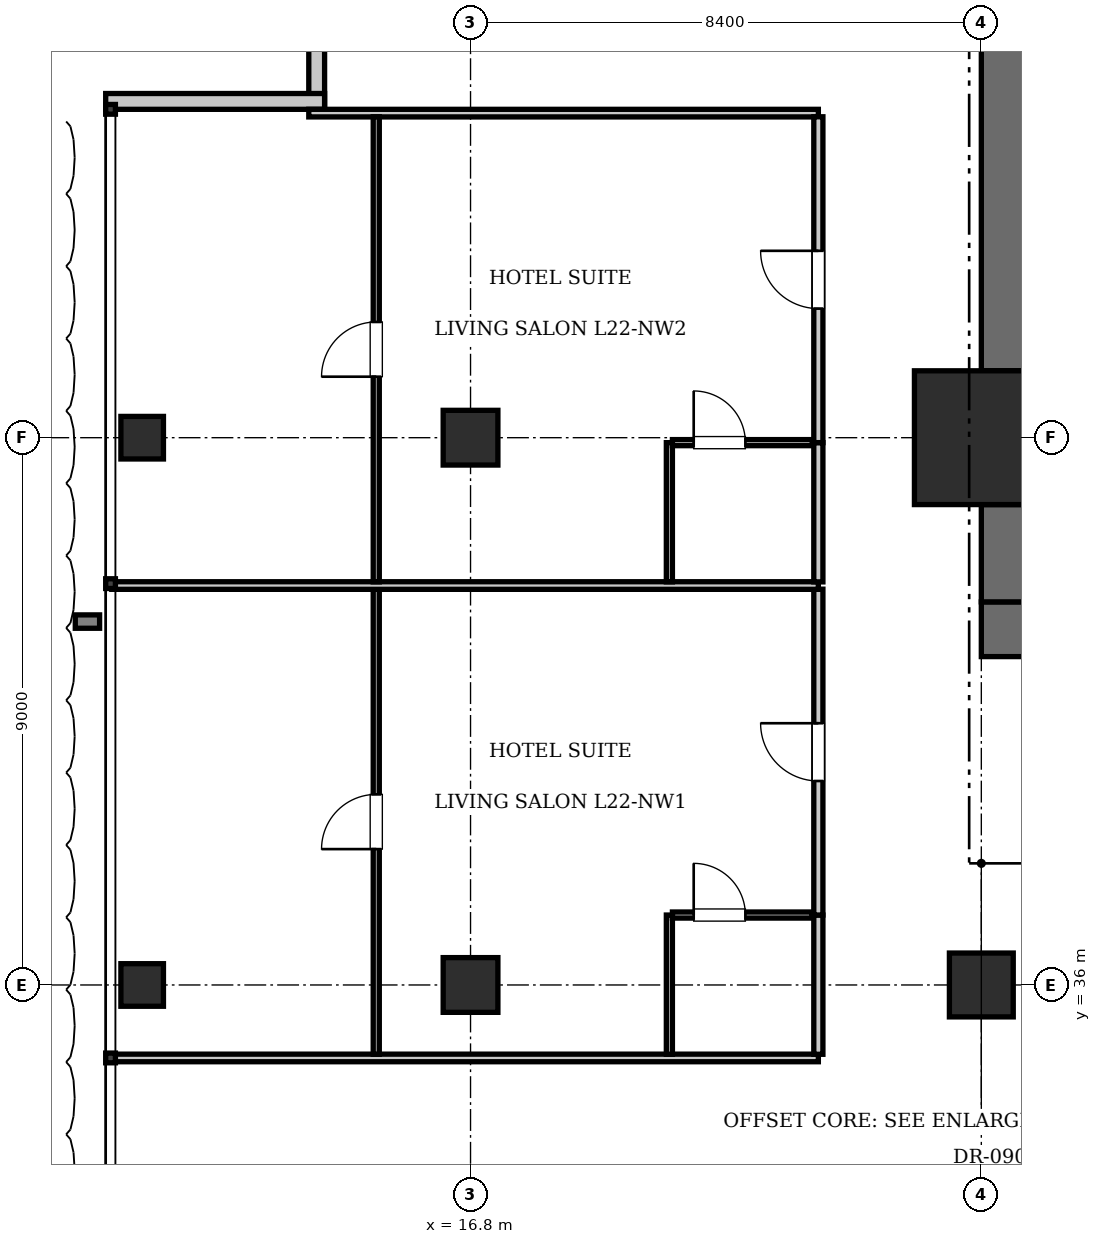
"""IFC4 building model, lengths in metres.
Left out: names, types, materials, properties, quantities, classifications, styles, units other than length and angle.
Written with IfcOpenShell. Run it as: python <this file> out.ifc"""

import sys

from ifc_helpers import new_model, si_unit, direction, frame, frame_2d, origin, origin_2d, place, context, subcontext, project, spatial, rectangle, i_section, extrude, element, fill, save


model = new_model("IFC4")
c1 = context("Model", 3, precision=1e-05, world=origin(), true_north=direction((0.0, 1.0)))
c2 = subcontext(c1, "Body", "Model", "MODEL_VIEW")
j1 = project(units=[si_unit("LENGTHUNIT", "METRE"), si_unit("PLANEANGLEUNIT", "RADIAN")], contexts=[c1])
p1 = place(None, origin())
s1 = spatial("IfcSite", under=j1, at=p1, CompositionType="ELEMENT")
p2 = place(p1, origin())
s2 = spatial("IfcBuilding", under=s1, at=p2, CompositionType="ELEMENT")
p3 = place(p2, frame((0.0, 0.0, 92.4)))
s3 = spatial("IfcBuildingStorey", under=s2, at=p3, CompositionType="ELEMENT", Elevation=92.4)
p4 = place(p3, frame((25.2, 45.0, 0.0), z_axis=(0.0, 0.0, 1.0), x_axis=(1.0, 0.0, 0.0)))
e1 = element("IfcColumn", 1, at=p4, inside=s3, PredefinedType="COLUMN", context=c2, shape_type="SweptSolid", body=[
    extrude(rectangle(XDim=2.2, YDim=2.2, at=origin_2d()), origin(), (0.0, 0.0, 1.0), 3.85),
])
p5 = place(p3, frame((25.2, 41.85, 0.0), z_axis=(0.0, 0.0, 1.0), x_axis=(1.0, 0.0, 0.0)))
e2 = element("IfcWall", 2, at=p5, inside=s3, PredefinedType="SHEAR", context=c2, shape_type="SweptSolid", body=[
    extrude(rectangle(XDim=6.8, YDim=0.9, at=frame_2d((3.4, 0.0))), origin(), (0.0, 0.0, 1.0), 3.85),
])
p6 = place(p5, frame((1.65, 0.0, 0.0)))
e3 = element("IfcOpeningElement", 3, at=p6, cuts=e2, PredefinedType="OPENING", context=c2, shape_type="SweptSolid", body=[
    extrude(rectangle(XDim=1.15, YDim=2.15, at=frame_2d((0.575, 1.075))), frame((0.0, 0.46, 0.0), z_axis=(0.0, -1.0, 0.0), x_axis=(1.0, 0.0, 0.0)), (0.0, 0.0, 1.0), 0.92),
])
p7 = place(p5, frame((5.15, 0.0, 0.0)))
e4 = element("IfcOpeningElement", 4, at=p7, cuts=e2, PredefinedType="OPENING", context=c2, shape_type="SweptSolid", body=[
    extrude(rectangle(XDim=1.1, YDim=2.2, at=frame_2d((0.55, 1.1))), frame((0.0, 0.46, 0.0), z_axis=(0.0, -1.0, 0.0), x_axis=(1.0, 0.0, 0.0)), (0.0, 0.0, 1.0), 0.92),
])
p8 = place(p3, frame((25.65, 42.3, 0.0), z_axis=(0.0, 0.0, 1.0), x_axis=(0.0, 1.0, 0.0)))
e5 = element("IfcWall", 5, at=p8, inside=s3, PredefinedType="SHEAR", context=c2, shape_type="SweptSolid", body=[
    extrude(rectangle(XDim=1.6, YDim=0.9, at=frame_2d((0.8, 0.0))), origin(), (0.0, 0.0, 1.0), 3.85),
])
p9 = place(p3, frame((25.65, 46.1, 0.0), z_axis=(0.0, 0.0, 1.0), x_axis=(0.0, 1.0, 0.0)))
e6 = element("IfcWall", 6, at=p9, inside=s3, PredefinedType="SHEAR", context=c2, shape_type="SweptSolid", body=[
    extrude(rectangle(XDim=7.0, YDim=0.9, at=frame_2d((3.5, 0.0))), origin(), (0.0, 0.0, 1.0), 3.85),
])
p10 = place(p3, frame((25.2, 36.0, 0.0), z_axis=(0.0, 0.0, 1.0), x_axis=(1.0, 0.0, 0.0)))
e7 = element("IfcColumn", 7, at=p10, inside=s3, PredefinedType="COLUMN", context=c2, shape_type="SweptSolid", body=[
    extrude(rectangle(XDim=1.05, YDim=1.05, at=origin_2d()), origin(), (0.0, 0.0, 1.0), 3.85),
])
for number, where, z_axis, x_axis in (
    (8, (16.8, 36.0, 0.0), (0.0, 0.0, 1.0), (1.0, 0.0, 0.0)),
    (9, (16.8, 45.0, 0.0), (0.0, 0.0, 1.0), (1.0, 0.0, 0.0)),
):
    element("IfcColumn", number, at=place(p3, frame(where, z_axis=z_axis, x_axis=x_axis)), inside=s3, PredefinedType="COLUMN", context=c2, shape_type="SweptSolid", body=[
        extrude(rectangle(XDim=0.9, YDim=0.9, at=origin_2d()), origin(), (0.0, 0.0, 1.0), 3.85),
    ])
for number, where, z_axis, x_axis in (
    (10, (11.4, 36.0, 0.0), (0.0, 0.0, 1.0), (1.0, 0.0, 0.0)),
    (11, (11.4, 45.0, 0.0), (0.0, 0.0, 1.0), (1.0, 0.0, 0.0)),
):
    element("IfcColumn", number, at=place(p3, frame(where, z_axis=z_axis, x_axis=x_axis)), inside=s3, PredefinedType="COLUMN", context=c2, shape_type="SweptSolid", body=[
        extrude(i_section(OverallWidth=0.7, OverallDepth=0.7, WebThickness=0.028, FlangeThickness=0.044, at=origin_2d()), origin(), (0.0, 0.0, 1.0), 3.85),
    ])
p11 = place(p3, frame((14.27, 50.4, 0.0), z_axis=(0.0, 0.0, 1.0), x_axis=(0.0, 1.0, 0.0)))
e12 = element("IfcWall", 12, at=p11, inside=s3, PredefinedType="SOLIDWALL", context=c2, shape_type="SweptSolid", body=[
    extrude(rectangle(XDim=3.6, YDim=0.26, at=frame_2d((1.8, 0.0))), origin(), (0.0, 0.0, 1.0), 3.61),
])
p12 = place(p3, frame((10.8, 50.53, 0.0), z_axis=(0.0, 0.0, 1.0), x_axis=(1.0, 0.0, 0.0)))
e13 = element("IfcWall", 13, at=p12, inside=s3, PredefinedType="SOLIDWALL", context=c2, shape_type="SweptSolid", body=[
    extrude(rectangle(XDim=3.6, YDim=0.26, at=frame_2d((1.8, 0.0))), origin(), (0.0, 0.0, 1.0), 3.61),
])
p13 = place(p3, frame((10.9, 34.8, 0.0), z_axis=(0.0, 0.0, 1.0), x_axis=(1.0, 0.0, 0.0)))
e14 = element("IfcWall", 14, at=p13, inside=s3, PredefinedType="PARTITIONING", context=c2, shape_type="SweptSolid", body=[
    extrude(rectangle(XDim=11.62, YDim=0.125, at=frame_2d((5.81, 0.0))), origin(), (0.0, 0.0, 1.0), 3.61),
])
p14 = place(p3, frame((14.14, 50.337, 0.0), z_axis=(0.0, 0.0, 1.0), x_axis=(1.0, 0.0, 0.0)))
e15 = element("IfcWall", 15, at=p14, inside=s3, PredefinedType="PARTITIONING", context=c2, shape_type="SweptSolid", body=[
    extrude(rectangle(XDim=8.38, YDim=0.125, at=frame_2d((4.19, 0.0))), origin(), (0.0, 0.0, 1.0), 3.61),
])
p15 = place(p3, frame((22.52, 34.86, 0.0), z_axis=(0.0, 0.0, 1.0), x_axis=(0.0, 1.0, 0.0)))
e16 = element("IfcWall", 16, at=p15, inside=s3, PredefinedType="PARTITIONING", context=c2, shape_type="SweptSolid", body=[
    extrude(rectangle(XDim=2.29, YDim=0.15, at=frame_2d((1.145, 0.0))), origin(), (0.0, 0.0, 1.0), 3.61),
])
p16 = place(p3, frame((22.52, 37.15, 0.0), z_axis=(0.0, 0.0, 1.0), x_axis=(0.0, 1.0, 0.0)))
e17 = element("IfcWall", 17, at=p16, inside=s3, PredefinedType="PARTITIONING", context=c2, shape_type="SweptSolid", body=[
    extrude(rectangle(XDim=5.359, YDim=0.15, at=frame_2d((2.679, 0.0))), origin(), (0.0, 0.0, 1.0), 3.61),
])
p17 = place(p16, frame((2.204, 0.0, 0.0)))
e18 = element("IfcOpeningElement", 18, at=p17, cuts=e17, PredefinedType="OPENING", context=c2, shape_type="SweptSolid", body=[
    extrude(rectangle(XDim=0.95, YDim=2.15, at=frame_2d((0.475, 1.075))), frame((0.0, 0.085, 0.0), z_axis=(0.0, -1.0, 0.0), x_axis=(1.0, 0.0, 0.0)), (0.0, 0.0, 1.0), 0.17),
])
p18 = place(p3, frame((20.07, 34.86, 0.0), z_axis=(0.0, 0.0, 1.0), x_axis=(0.0, 1.0, 0.0)))
e19 = element("IfcWall", 19, at=p18, inside=s3, PredefinedType="PARTITIONING", context=c2, shape_type="SweptSolid", body=[
    extrude(rectangle(XDim=2.29, YDim=0.1, at=frame_2d((1.145, 0.0))), origin(), (0.0, 0.0, 1.0), 3.61),
])
p19 = place(p3, frame((20.12, 37.15, 0.0), z_axis=(0.0, 0.0, 1.0), x_axis=(1.0, 0.0, 0.0)))
e20 = element("IfcWall", 20, at=p19, inside=s3, PredefinedType="PARTITIONING", context=c2, shape_type="SweptSolid", body=[
    extrude(rectangle(XDim=2.3, YDim=0.1, at=frame_2d((1.15, 0.0))), origin(), (0.0, 0.0, 1.0), 3.61),
])
p20 = place(p19, frame((0.35, 0.0, 0.0)))
e21 = element("IfcOpeningElement", 21, at=p20, cuts=e20, PredefinedType="OPENING", context=c2, shape_type="SweptSolid", body=[
    extrude(rectangle(XDim=0.85, YDim=2.1, at=frame_2d((0.425, 1.05))), frame((0.0, 0.06, 0.0), z_axis=(0.0, -1.0, 0.0), x_axis=(1.0, 0.0, 0.0)), (0.0, 0.0, 1.0), 0.12),
])
p21 = place(p3, frame((15.25, 34.86, 0.0), z_axis=(0.0, 0.0, 1.0), x_axis=(0.0, 1.0, 0.0)))
e22 = element("IfcWall", 22, at=p21, inside=s3, PredefinedType="PARTITIONING", context=c2, shape_type="SweptSolid", body=[
    extrude(rectangle(XDim=7.649, YDim=0.1, at=frame_2d((3.824, 0.0))), origin(), (0.0, 0.0, 1.0), 3.61),
])
p22 = place(p21, frame((3.374, 0.0, 0.0)))
e23 = element("IfcOpeningElement", 23, at=p22, cuts=e22, PredefinedType="OPENING", context=c2, shape_type="SweptSolid", body=[
    extrude(rectangle(XDim=0.9, YDim=2.1, at=frame_2d((0.45, 1.05))), frame((0.0, 0.06, 0.0), z_axis=(0.0, -1.0, 0.0), x_axis=(1.0, 0.0, 0.0)), (0.0, 0.0, 1.0), 0.12),
])
p23 = place(p3, frame((10.9, 42.569, 0.0), z_axis=(0.0, 0.0, 1.0), x_axis=(1.0, 0.0, 0.0)))
e24 = element("IfcWall", 24, at=p23, inside=s3, PredefinedType="PARTITIONING", context=c2, shape_type="SweptSolid", body=[
    extrude(rectangle(XDim=11.62, YDim=0.125, at=frame_2d((5.81, 0.0))), origin(), (0.0, 0.0, 1.0), 3.61),
])
p24 = place(p3, frame((22.52, 42.629, 0.0), z_axis=(0.0, 0.0, 1.0), x_axis=(0.0, 1.0, 0.0)))
e25 = element("IfcWall", 25, at=p24, inside=s3, PredefinedType="PARTITIONING", context=c2, shape_type="SweptSolid", body=[
    extrude(rectangle(XDim=2.29, YDim=0.15, at=frame_2d((1.145, 0.0))), origin(), (0.0, 0.0, 1.0), 3.61),
])
p25 = place(p3, frame((22.52, 44.919, 0.0), z_axis=(0.0, 0.0, 1.0), x_axis=(0.0, 1.0, 0.0)))
e26 = element("IfcWall", 26, at=p25, inside=s3, PredefinedType="PARTITIONING", context=c2, shape_type="SweptSolid", body=[
    extrude(rectangle(XDim=5.359, YDim=0.15, at=frame_2d((2.679, 0.0))), origin(), (0.0, 0.0, 1.0), 3.61),
])
p26 = place(p25, frame((2.204, 0.0, 0.0)))
e27 = element("IfcOpeningElement", 27, at=p26, cuts=e26, PredefinedType="OPENING", context=c2, shape_type="SweptSolid", body=[
    extrude(rectangle(XDim=0.95, YDim=2.15, at=frame_2d((0.475, 1.075))), frame((0.0, 0.085, 0.0), z_axis=(0.0, -1.0, 0.0), x_axis=(1.0, 0.0, 0.0)), (0.0, 0.0, 1.0), 0.17),
])
p27 = place(p3, frame((20.07, 42.629, 0.0), z_axis=(0.0, 0.0, 1.0), x_axis=(0.0, 1.0, 0.0)))
e28 = element("IfcWall", 28, at=p27, inside=s3, PredefinedType="PARTITIONING", context=c2, shape_type="SweptSolid", body=[
    extrude(rectangle(XDim=2.29, YDim=0.1, at=frame_2d((1.145, 0.0))), origin(), (0.0, 0.0, 1.0), 3.61),
])
p28 = place(p3, frame((20.12, 44.919, 0.0), z_axis=(0.0, 0.0, 1.0), x_axis=(1.0, 0.0, 0.0)))
e29 = element("IfcWall", 29, at=p28, inside=s3, PredefinedType="PARTITIONING", context=c2, shape_type="SweptSolid", body=[
    extrude(rectangle(XDim=2.3, YDim=0.1, at=frame_2d((1.15, 0.0))), origin(), (0.0, 0.0, 1.0), 2.999),
])
p29 = place(p28, frame((0.35, 0.0, 0.0)))
e30 = element("IfcOpeningElement", 30, at=p29, cuts=e29, PredefinedType="OPENING", context=c2, shape_type="SweptSolid", body=[
    extrude(rectangle(XDim=0.85, YDim=2.1, at=frame_2d((0.425, 1.05))), frame((0.0, 0.06, 0.0), z_axis=(0.0, -1.0, 0.0), x_axis=(1.0, 0.0, 0.0)), (0.0, 0.0, 1.0), 0.12),
])
p30 = place(p3, frame((15.25, 42.629, 0.0), z_axis=(0.0, 0.0, 1.0), x_axis=(0.0, 1.0, 0.0)))
e31 = element("IfcWall", 31, at=p30, inside=s3, PredefinedType="PARTITIONING", context=c2, shape_type="SweptSolid", body=[
    extrude(rectangle(XDim=7.649, YDim=0.1, at=frame_2d((3.824, 0.0))), origin(), (0.0, 0.0, 1.0), 3.61),
])
p31 = place(p30, frame((3.375, 0.0, 0.0)))
e32 = element("IfcOpeningElement", 32, at=p31, cuts=e31, PredefinedType="OPENING", context=c2, shape_type="SweptSolid", body=[
    extrude(rectangle(XDim=0.9, YDim=2.1, at=frame_2d((0.45, 1.05))), frame((0.0, 0.06, 0.0), z_axis=(0.0, -1.0, 0.0), x_axis=(1.0, 0.0, 0.0)), (0.0, 0.0, 1.0), 0.12),
])
p32 = place(p20, origin())
e33 = element("IfcDoor", 33, at=p32, inside=s3, OperationType="SINGLE_SWING_LEFT", PredefinedType="DOOR", context=c2, shape_type="SweptSolid", body=[
    extrude(rectangle(XDim=0.85, YDim=2.1, at=frame_2d((0.425, 1.05))), frame((0.0, 0.025, 0.0), z_axis=(0.0, -1.0, 0.0), x_axis=(1.0, 0.0, 0.0)), (0.0, 0.0, 1.0), 0.05),
])
fill(e21, e33)
p33 = place(p17, origin())
e34 = element("IfcDoor", 34, at=p33, inside=s3, OperationType="SINGLE_SWING_RIGHT", PredefinedType="DOOR", context=c2, shape_type="SweptSolid", body=[
    extrude(rectangle(XDim=0.95, YDim=2.15, at=frame_2d((0.475, 1.075))), frame((0.0, 0.025, 0.0), z_axis=(0.0, -1.0, 0.0), x_axis=(1.0, 0.0, 0.0)), (0.0, 0.0, 1.0), 0.05),
])
fill(e18, e34)
p34 = place(p22, origin())
e35 = element("IfcDoor", 35, at=p34, inside=s3, OperationType="SINGLE_SWING_LEFT", PredefinedType="DOOR", context=c2, shape_type="SweptSolid", body=[
    extrude(rectangle(XDim=0.9, YDim=2.1, at=frame_2d((0.45, 1.05))), frame((0.0, 0.025, 0.0), z_axis=(0.0, -1.0, 0.0), x_axis=(1.0, 0.0, 0.0)), (0.0, 0.0, 1.0), 0.05),
])
fill(e23, e35)
p35 = place(p29, origin())
e36 = element("IfcDoor", 36, at=p35, inside=s3, OperationType="SINGLE_SWING_LEFT", PredefinedType="DOOR", context=c2, shape_type="SweptSolid", body=[
    extrude(rectangle(XDim=0.85, YDim=2.1, at=frame_2d((0.425, 1.05))), frame((0.0, 0.025, 0.0), z_axis=(0.0, -1.0, 0.0), x_axis=(1.0, 0.0, 0.0)), (0.0, 0.0, 1.0), 0.05),
])
fill(e30, e36)
p36 = place(p26, origin())
e37 = element("IfcDoor", 37, at=p36, inside=s3, OperationType="SINGLE_SWING_RIGHT", PredefinedType="DOOR", context=c2, shape_type="SweptSolid", body=[
    extrude(rectangle(XDim=0.95, YDim=2.15, at=frame_2d((0.475, 1.075))), frame((0.0, 0.025, 0.0), z_axis=(0.0, -1.0, 0.0), x_axis=(1.0, 0.0, 0.0)), (0.0, 0.0, 1.0), 0.05),
])
fill(e27, e37)
p37 = place(p31, origin())
e38 = element("IfcDoor", 38, at=p37, inside=s3, OperationType="SINGLE_SWING_LEFT", PredefinedType="DOOR", context=c2, shape_type="SweptSolid", body=[
    extrude(rectangle(XDim=0.9, YDim=2.1, at=frame_2d((0.45, 1.05))), frame((0.0, 0.025, 0.0), z_axis=(0.0, -1.0, 0.0), x_axis=(1.0, 0.0, 0.0)), (0.0, 0.0, 1.0), 0.05),
])
fill(e32, e38)
save(model, sys.argv[1])
